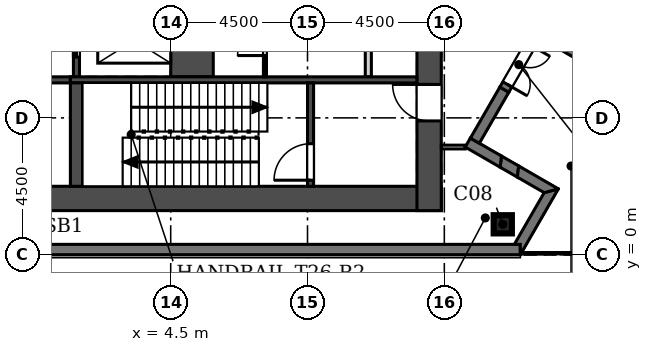
"""IFC4 building model, lengths in metres.
Left out: names, types, materials, properties, quantities, classifications, styles, units other than length and angle.
Written with IfcOpenShell. Run it as: python <this file> out.ifc"""

import sys

from ifc_helpers import new_model, si_unit, direction, frame, frame_2d, origin, origin_2d, place, context, subcontext, project, spatial, polyline, rectangle, hollow_rectangle, outline, extrude, element, fill, save


model = new_model("IFC4")
c1 = context("Model", 3, precision=1e-05, world=origin(), true_north=direction((0.0, 1.0)))
c2 = subcontext(c1, "Body", "Model", "MODEL_VIEW")
j1 = project(units=[si_unit("LENGTHUNIT", "METRE"), si_unit("PLANEANGLEUNIT", "RADIAN")], contexts=[c1])
p1 = place(None, origin())
s1 = spatial("IfcSite", under=j1, at=p1, CompositionType="ELEMENT")
p2 = place(p1, origin())
s2 = spatial("IfcBuilding", under=s1, at=p2, CompositionType="ELEMENT")
p3 = place(p2, frame((0.0, 0.0, 344.7)))
s3 = spatial("IfcBuildingStorey", under=s2, at=p3, CompositionType="ELEMENT", Elevation=344.7)
p4 = place(p3, frame((15.423, 1.0, 0.0), z_axis=(0.0, 0.0, 1.0), x_axis=(1.0, 0.0, 0.0)))
e1 = element("IfcColumn", 1, at=p4, inside=s3, PredefinedType="COLUMN", context=c2, shape_type="SweptSolid", body=[
    extrude(hollow_rectangle(XDim=0.6, YDim=0.6, WallThickness=0.03, at=origin_2d()), origin(), (0.0, 0.0, 1.0), 4.8),
])
p5 = place(p3, frame((-13.4, 1.85, 0.0), z_axis=(0.0, 0.0, 1.0), x_axis=(1.0, 0.0, 0.0)))
e2 = element("IfcWall", 2, at=p5, inside=s3, PredefinedType="SHEAR", context=c2, shape_type="SweptSolid", body=[
    extrude(rectangle(XDim=26.8, YDim=0.8, at=frame_2d((13.4, 0.0))), origin(), (0.0, 0.0, 1.0), 4.8),
])
p6 = place(p3, frame((13.0, 1.45, 0.0), z_axis=(0.0, 0.0, 1.0), x_axis=(0.0, 1.0, 0.0)))
e3 = element("IfcWall", 3, at=p6, inside=s3, PredefinedType="SHEAR", context=c2, shape_type="SweptSolid", body=[
    extrude(rectangle(XDim=9.442, YDim=0.8, at=frame_2d((4.721, 0.0))), origin(), (0.0, 0.0, 1.0), 4.8),
])
p7 = place(p6, frame((2.95, 0.0, 0.0)))
e4 = element("IfcOpeningElement", 4, at=p7, cuts=e3, PredefinedType="OPENING", context=c2, shape_type="SweptSolid", body=[
    extrude(rectangle(XDim=1.2, YDim=2.1, at=frame_2d((0.6, 1.05))), frame((0.0, 0.41, 0.0), z_axis=(0.0, -1.0, 0.0), x_axis=(1.0, 0.0, 0.0)), (0.0, 0.0, 1.0), 0.82),
])
p8 = place(p6, frame((6.95, 0.0, 0.0)))
e5 = element("IfcOpeningElement", 5, at=p8, cuts=e3, PredefinedType="OPENING", context=c2, shape_type="SweptSolid", body=[
    extrude(rectangle(XDim=1.2, YDim=2.1, at=frame_2d((0.6, 1.05))), frame((0.0, 0.41, 0.0), z_axis=(0.0, -1.0, 0.0), x_axis=(1.0, 0.0, 0.0)), (0.0, 0.0, 1.0), 0.82),
])
p9 = place(p3, frame((-16.0, 0.17, 0.0), z_axis=(0.0, 0.0, 1.0), x_axis=(1.0, 0.0, 0.0)))
e6 = element("IfcWall", 6, at=p9, inside=s3, PredefinedType="SOLIDWALL", context=c2, shape_type="SweptSolid", body=[
    extrude(rectangle(XDim=32.0, YDim=0.34, at=frame_2d((16.0, 0.0))), origin(), (0.0, 0.0, 1.0), 4.8),
])
p10 = place(p3, origin())
e7 = element("IfcWall", 7, at=p10, inside=s3, PredefinedType="SOLIDWALL", context=c2, shape_type="SweptSolid", body=[
    extrude(outline(polyline([(17.251, 2.166), (16.0, -0.001), (16.0, -0.001), (16.0, 0.339), (15.803, 0.339), (16.785, 2.041), (17.251, 2.166), (17.251, 2.166)])), origin(), (0.0, 0.0, 1.0), 4.8),
])
p11 = place(p3, origin())
e8 = element("IfcWall", 8, at=p11, inside=s3, PredefinedType="SOLIDWALL", context=c2, shape_type="SweptSolid", body=[
    extrude(outline(polyline([(15.946, 2.919), (15.903, 2.549), (15.337, 2.876), (15.379, 3.246), (15.946, 2.919)])), origin(), (0.0, 0.0, 1.0), 3.9),
])
p12 = place(p3, origin())
e9 = element("IfcWall", 9, at=p12, inside=s3, PredefinedType="SOLIDWALL", context=c2, shape_type="SweptSolid", body=[
    extrude(outline(polyline([(14.357, 3.836), (14.652, 3.666), (15.379, 3.246), (15.337, 2.876), (14.187, 3.54), (14.357, 3.836)])), origin(), (0.0, 0.0, 1.0), 4.8),
])
p13 = place(p3, origin())
e10 = element("IfcWall", 10, at=p13, inside=s3, PredefinedType="SOLIDWALL", context=c2, shape_type="SweptSolid", body=[
    extrude(outline(polyline([(17.251, 2.165), (17.251, 2.165), (16.785, 2.04), (15.903, 2.549), (15.946, 2.919), (17.251, 2.165)])), origin(), (0.0, 0.0, 1.0), 4.8),
])
p14 = place(p3, frame((14.505, 3.75, 0.0), z_axis=(0.0, 0.0, 1.0), x_axis=(0.500027802648, 0.866009351323, 0.0)))
e11 = element("IfcWall", 11, at=p14, inside=s3, PredefinedType="SOLIDWALL", context=c2, shape_type="SweptSolid", body=[
    extrude(rectangle(XDim=1.938, YDim=0.34, at=frame_2d((0.969, 0.0))), origin(), (0.0, 0.0, 1.0), 4.8),
])
p15 = place(p3, frame((15.474, 5.428, 0.0), z_axis=(0.0, 0.0, 1.0), x_axis=(0.499971832445, 0.866041665719, 0.0)))
e12 = element("IfcWall", 12, at=p15, inside=s3, PredefinedType="SOLIDWALL", context=c2, shape_type="SweptSolid", body=[
    extrude(rectangle(XDim=2.062, YDim=0.34, at=frame_2d((1.031, 0.0))), origin(), (0.0, 0.0, 1.0), 3.9),
])
p16 = place(p15, frame((0.2, 0.0, 0.0)))
e13 = element("IfcOpeningElement", 13, at=p16, cuts=e12, PredefinedType="OPENING", context=c2, shape_type="SweptSolid", body=[
    extrude(rectangle(XDim=1.5, YDim=2.4, at=frame_2d((0.75, 1.2))), frame((0.0, 0.18, 0.0), z_axis=(0.0, -1.0, 0.0), x_axis=(1.0, 0.0, 0.0)), (0.0, 0.0, 1.0), 0.36),
])
p17 = place(p3, origin())
e14 = element("IfcWall", 14, at=p17, inside=s3, PredefinedType="SOLIDWALL", context=c2, shape_type="SweptSolid", body=[
    extrude(outline(polyline([(16.652, 7.129), (16.444, 7.248), (16.473, 7.501), (16.527, 7.594), (19.126, 6.094), (19.251, 5.628), (19.25, 5.628), (16.652, 7.129)])), origin(), (0.0, 0.0, 1.0), 4.8),
])
p18 = place(p3, frame((11.0, 5.85, 0.0), z_axis=(0.0, 0.0, 1.0), x_axis=(0.0, 1.0, 0.0)))
e15 = element("IfcWall", 15, at=p18, inside=s3, PredefinedType="SOLIDWALL", context=c2, shape_type="SweptSolid", body=[
    extrude(rectangle(XDim=7.4, YDim=0.2, at=frame_2d((3.7, 0.0))), origin(), (0.0, 0.0, 1.0), 4.8),
])
p19 = place(p3, frame((1.4, 5.85, -0.8), z_axis=(0.0, 0.0, 1.0), x_axis=(0.0, 1.0, 0.0)))
e16 = element("IfcWall", 16, at=p19, inside=s3, PredefinedType="SOLIDWALL", context=c2, shape_type="SweptSolid", body=[
    extrude(rectangle(XDim=11.75, YDim=0.2, at=frame_2d((5.875, 0.0))), origin(), (0.0, 0.0, 1.0), 5.6),
])
p20 = place(p19, frame((3.2, 0.0, 0.8)))
e17 = element("IfcOpeningElement", 17, at=p20, cuts=e16, PredefinedType="OPENING", context=c2, shape_type="SweptSolid", body=[
    extrude(rectangle(XDim=1.2, YDim=2.1, at=frame_2d((0.6, 1.05))), frame((0.0, 0.11, 0.0), z_axis=(0.0, -1.0, 0.0), x_axis=(1.0, 0.0, 0.0)), (0.0, 0.0, 1.0), 0.22),
])
p21 = place(p19, frame((8.4, 0.0, 0.8)))
e18 = element("IfcOpeningElement", 18, at=p21, cuts=e16, PredefinedType="OPENING", context=c2, shape_type="SweptSolid", body=[
    extrude(rectangle(XDim=1.2, YDim=2.1, at=frame_2d((0.6, 1.05))), frame((0.0, 0.11, 0.0), z_axis=(0.0, -1.0, 0.0), x_axis=(1.0, 0.0, 0.0)), (0.0, 0.0, 1.0), 0.22),
])
p22 = place(p19, frame((0.65, 0.0, 0.8)))
e19 = element("IfcOpeningElement", 19, at=p22, cuts=e16, PredefinedType="OPENING", context=c2, shape_type="SweptSolid", body=[
    extrude(rectangle(XDim=1.1, YDim=2.1, at=frame_2d((0.55, 1.05))), frame((0.0, 0.11, 0.0), z_axis=(0.0, -1.0, 0.0), x_axis=(1.0, 0.0, 0.0)), (0.0, 0.0, 1.0), 0.22),
])
p23 = place(p19, frame((5.9, 0.0, 0.8)))
e20 = element("IfcOpeningElement", 20, at=p23, cuts=e16, PredefinedType="OPENING", context=c2, shape_type="SweptSolid", body=[
    extrude(rectangle(XDim=1.0, YDim=2.1, at=frame_2d((0.5, 1.05))), frame((0.0, 0.11, 0.0), z_axis=(0.0, -1.0, 0.0), x_axis=(1.0, 0.0, 0.0)), (0.0, 0.0, 1.0), 0.22),
])
p24 = place(p3, frame((5.2, 5.85, -0.8), z_axis=(0.0, 0.0, 1.0), x_axis=(0.0, 1.0, 0.0)))
e21 = element("IfcWall", 21, at=p24, inside=s3, PredefinedType="SOLIDWALL", context=c2, shape_type="SweptSolid", body=[
    extrude(rectangle(XDim=2.4, YDim=1.4, at=frame_2d((1.2, 0.0))), origin(), (0.0, 0.0, 1.0), 5.6),
])
p25 = place(p3, frame((-1.2, 5.75, -0.8), z_axis=(0.0, 0.0, 1.0), x_axis=(1.0, 0.0, 0.0)))
e22 = element("IfcWall", 22, at=p25, inside=s3, PredefinedType="SOLIDWALL", context=c2, shape_type="SweptSolid", body=[
    extrude(rectangle(XDim=2.4, YDim=0.2, at=frame_2d((1.2, 0.0))), origin(), (0.0, 0.0, 1.0), 5.6),
])
p26 = place(p25, frame((0.7, 0.0, 0.8)))
e23 = element("IfcOpeningElement", 23, at=p26, cuts=e22, PredefinedType="OPENING", context=c2, shape_type="SweptSolid", body=[
    extrude(rectangle(XDim=1.0, YDim=2.1, at=frame_2d((0.5, 1.05))), frame((0.0, 0.11, 0.0), z_axis=(0.0, -1.0, 0.0), x_axis=(1.0, 0.0, 0.0)), (0.0, 0.0, 1.0), 0.22),
])
p27 = place(p3, frame((1.2, 5.75, -0.8), z_axis=(0.0, 0.0, 1.0), x_axis=(1.0, 0.0, 0.0)))
e24 = element("IfcWall", 24, at=p27, inside=s3, PredefinedType="SOLIDWALL", context=c2, shape_type="SweptSolid", body=[
    extrude(rectangle(XDim=11.4, YDim=0.2, at=frame_2d((5.7, 0.0))), origin(), (0.0, 0.0, 1.0), 5.6),
])
p28 = place(p3, frame((9.1, 2.25, -0.8), z_axis=(0.0, 0.0, 1.0), x_axis=(0.0, 1.0, 0.0)))
e25 = element("IfcWall", 25, at=p28, inside=s3, PredefinedType="SOLIDWALL", context=c2, shape_type="SweptSolid", body=[
    extrude(rectangle(XDim=3.4, YDim=0.2, at=frame_2d((1.7, 0.0))), origin(), (0.0, 0.0, 1.0), 5.6),
])
p29 = place(p28, frame((0.2, 0.0, 0.8)))
e26 = element("IfcOpeningElement", 26, at=p29, cuts=e25, PredefinedType="OPENING", context=c2, shape_type="SweptSolid", body=[
    extrude(rectangle(XDim=1.2, YDim=2.1, at=frame_2d((0.6, 1.05))), frame((0.0, 0.11, 0.0), z_axis=(0.0, -1.0, 0.0), x_axis=(1.0, 0.0, 0.0)), (0.0, 0.0, 1.0), 0.22),
])
p30 = place(p3, frame((1.4, 2.25, -0.8), z_axis=(0.0, 0.0, 1.0), x_axis=(0.0, 1.0, 0.0)))
e27 = element("IfcWall", 27, at=p30, inside=s3, PredefinedType="SOLIDWALL", context=c2, shape_type="SweptSolid", body=[
    extrude(rectangle(XDim=3.4, YDim=0.4, at=frame_2d((1.7, 0.0))), origin(), (0.0, 0.0, 1.0), 5.6),
])
p31 = place(p3, frame((7.6, 5.85, 0.0), z_axis=(0.0, 0.0, 1.0), x_axis=(0.0, 1.0, 0.0)))
e28 = element("IfcWall", 28, at=p31, inside=s3, PredefinedType="PARTITIONING", context=c2, shape_type="SweptSolid", body=[
    extrude(rectangle(XDim=2.4, YDim=0.1, at=frame_2d((1.2, 0.0))), origin(), (0.0, 0.0, 1.0), 4.8),
])
p32 = place(p31, frame((0.7, 0.0, 0.0)))
e29 = element("IfcOpeningElement", 29, at=p32, cuts=e28, PredefinedType="OPENING", context=c2, shape_type="SweptSolid", body=[
    extrude(rectangle(XDim=0.9, YDim=2.1, at=frame_2d((0.45, 1.05))), frame((0.0, 0.06, 0.0), z_axis=(0.0, -1.0, 0.0), x_axis=(1.0, 0.0, 0.0)), (0.0, 0.0, 1.0), 0.12),
])
p33 = place(p3, frame((14.188, 3.541, 0.0), z_axis=(0.0, 0.0, 1.0), x_axis=(-1.0, 0.0, 0.0)))
e30 = element("IfcWall", 30, at=p33, inside=s3, PredefinedType="PARTITIONING", context=c2, shape_type="SweptSolid", body=[
    extrude(rectangle(XDim=0.788, YDim=0.125, at=frame_2d((0.394, 0.0))), origin(), (0.0, 0.0, 1.0), 4.8),
])
p34 = place(p16, frame((1.5, 0.0, 0.0), z_axis=(0.0, 0.0, 1.0), x_axis=(-1.0, 0.0, 0.0)))
e31 = element("IfcDoor", 31, at=p34, inside=s3, OperationType="DOUBLE_DOOR_SINGLE_SWING", PredefinedType="DOOR", context=c2, shape_type="SweptSolid", body=[
    extrude(rectangle(XDim=1.5, YDim=2.4, at=frame_2d((0.75, 1.2))), frame((0.0, 0.025, 0.0), z_axis=(0.0, -1.0, 0.0), x_axis=(1.0, 0.0, 0.0)), (0.0, 0.0, 1.0), 0.05),
])
fill(e13, e31)
p35 = place(p22, origin())
e32 = element("IfcDoor", 32, at=p35, inside=s3, OperationType="SLIDING_TO_RIGHT", PredefinedType="DOOR", context=c2, shape_type="SweptSolid", body=[
    extrude(rectangle(XDim=1.1, YDim=2.1, at=frame_2d((0.55, 1.05))), frame((0.0, 0.025, 0.0), z_axis=(0.0, -1.0, 0.0), x_axis=(1.0, 0.0, 0.0)), (0.0, 0.0, 1.0), 0.05),
])
fill(e19, e32)
p36 = place(p32, origin())
e33 = element("IfcDoor", 33, at=p36, inside=s3, OperationType="SINGLE_SWING_LEFT", PredefinedType="DOOR", context=c2, shape_type="SweptSolid", body=[
    extrude(rectangle(XDim=0.9, YDim=2.1, at=frame_2d((0.45, 1.05))), frame((0.0, 0.025, 0.0), z_axis=(0.0, -1.0, 0.0), x_axis=(1.0, 0.0, 0.0)), (0.0, 0.0, 1.0), 0.05),
])
fill(e29, e33)
p37 = place(p7, origin())
e34 = element("IfcDoor", 34, at=p37, inside=s3, OperationType="SINGLE_SWING_RIGHT", PredefinedType="DOOR", context=c2, shape_type="SweptSolid", body=[
    extrude(rectangle(XDim=1.2, YDim=2.1, at=frame_2d((0.6, 1.05))), frame((0.0, 0.025, 0.0), z_axis=(0.0, -1.0, 0.0), x_axis=(1.0, 0.0, 0.0)), (0.0, 0.0, 1.0), 0.05),
])
fill(e4, e34)
p38 = place(p29, origin())
e35 = element("IfcDoor", 35, at=p38, inside=s3, OperationType="SINGLE_SWING_LEFT", PredefinedType="DOOR", context=c2, shape_type="SweptSolid", body=[
    extrude(rectangle(XDim=1.2, YDim=2.1, at=frame_2d((0.6, 1.05))), frame((0.0, 0.025, 0.0), z_axis=(0.0, -1.0, 0.0), x_axis=(1.0, 0.0, 0.0)), (0.0, 0.0, 1.0), 0.05),
])
fill(e26, e35)
save(model, sys.argv[1])
